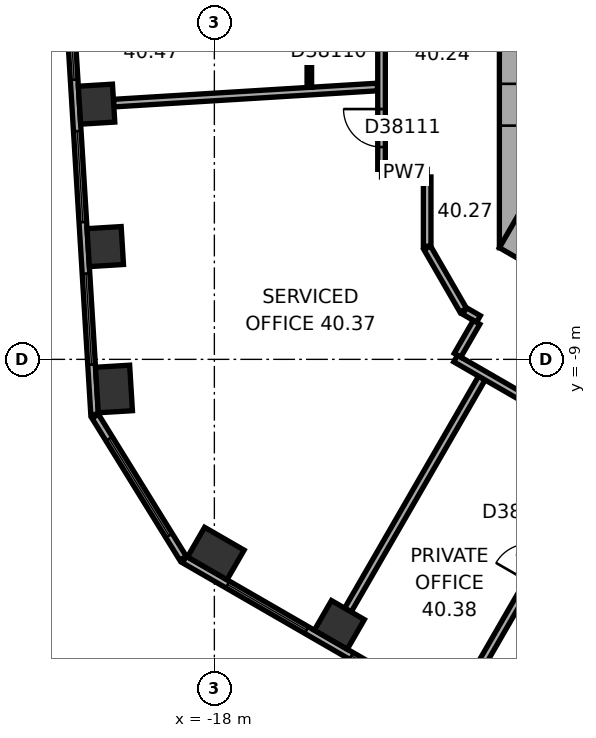
"""IFC4 building model, lengths in metres.
Left out: names, types, materials, properties, quantities, classifications, styles, units other than length and angle.
Written with IfcOpenShell. Run it as: python <this file> out.ifc"""

import sys

from ifc_helpers import new_model, si_unit, direction, frame, frame_2d, origin, origin_2d, place, context, subcontext, project, spatial, rectangle, extrude, element, fill, save


model = new_model("IFC4")
c1 = context("Model", 3, precision=1e-05, world=origin(), true_north=direction((0.0, 1.0)))
c2 = subcontext(c1, "Body", "Model", "MODEL_VIEW")
j1 = project(units=[si_unit("LENGTHUNIT", "METRE"), si_unit("PLANEANGLEUNIT", "RADIAN")], contexts=[c1])
p1 = place(None, origin())
s1 = spatial("IfcSite", under=j1, at=p1, CompositionType="ELEMENT")
p2 = place(p1, origin())
s2 = spatial("IfcBuilding", under=s1, at=p2, CompositionType="ELEMENT")
p3 = place(p2, frame((0.0, 0.0, 165.1)))
s3 = spatial("IfcBuildingStorey", under=s2, at=p3, CompositionType="ELEMENT", Elevation=165.1)
for number, where, z_axis, x_axis in (
    (1, (-21.1, -2.285, 0.0), (0.0, 0.0, 1.0), (0.061, -0.998, 0.0)),
    (2, (-20.871, -6.032, 0.0), (0.0, 0.0, 1.0), (0.061, -0.998, 0.0)),
):
    element("IfcColumn", number, at=place(p3, frame(where, z_axis=z_axis, x_axis=x_axis)), inside=s3, PredefinedType="COLUMN", context=c2, shape_type="SweptSolid", body=[
        extrude(rectangle(XDim=1.0, YDim=0.9, at=origin_2d()), origin(), (0.0, 0.0, 1.0), 3.7),
    ])
for number, where, z_axis, x_axis in (
    (3, (-20.642, -9.779, 0.0), (0.0, 0.0, 1.0), (0.061, -0.998, 0.0)),
    (4, (-17.962, -14.109, 0.0), (0.0, 0.0, 1.0), (0.866, -0.5, 0.0)),
):
    element("IfcColumn", number, at=place(p3, frame(where, z_axis=z_axis, x_axis=x_axis)), inside=s3, PredefinedType="COLUMN", context=c2, shape_type="SweptSolid", body=[
        extrude(rectangle(XDim=1.2, YDim=0.9, at=origin_2d()), origin(), (0.0, 0.0, 1.0), 3.7),
    ])
p4 = place(p3, frame((-14.711, -15.986, 0.0), z_axis=(0.0, 0.0, 1.0), x_axis=(0.866025403784, -0.5, 0.0)))
e5 = element("IfcColumn", 5, at=p4, inside=s3, PredefinedType="COLUMN", context=c2, shape_type="SweptSolid", body=[
    extrude(rectangle(XDim=1.0, YDim=0.9, at=origin_2d()), origin(), (0.0, 0.0, 1.0), 3.7),
])
p5 = place(p3, frame((-10.0, 6.062, 0.0), z_axis=(0.0, 0.0, 1.0), x_axis=(0.0, -1.0, 0.0)))
e6 = element("IfcWall", 6, at=p5, inside=s3, PredefinedType="SHEAR", context=c2, shape_type="SweptSolid", body=[
    extrude(rectangle(XDim=12.125, YDim=1.0, at=frame_2d((6.062, 0.0))), origin(), (0.0, 0.0, 1.0), 3.7),
])
p6 = place(p5, frame((5.212, 0.0, 0.0)))
e7 = element("IfcOpeningElement", 7, at=p6, cuts=e6, PredefinedType="OPENING", context=c2, shape_type="SweptSolid", body=[
    extrude(rectangle(XDim=1.1, YDim=2.1, at=frame_2d((0.55, 1.05))), frame((0.0, 0.51, 0.0), z_axis=(0.0, -1.0, 0.0), x_axis=(1.0, 0.0, 0.0)), (0.0, 0.0, 1.0), 1.02),
])
p7 = place(p5, frame((7.812, 0.0, 0.0)))
e8 = element("IfcOpeningElement", 8, at=p7, cuts=e6, PredefinedType="OPENING", context=c2, shape_type="SweptSolid", body=[
    extrude(rectangle(XDim=1.1, YDim=2.1, at=frame_2d((0.55, 1.05))), frame((0.0, 0.51, 0.0), z_axis=(0.0, -1.0, 0.0), x_axis=(1.0, 0.0, 0.0)), (0.0, 0.0, 1.0), 1.02),
])
p8 = place(p3, frame((-10.25, -5.629, 0.0), z_axis=(0.0, 0.0, 1.0), x_axis=(0.866022616891, -0.50000482701, 0.0)))
e9 = element("IfcWall", 9, at=p8, inside=s3, PredefinedType="SHEAR", context=c2, shape_type="SweptSolid", body=[
    extrude(rectangle(XDim=12.125, YDim=1.0, at=frame_2d((6.062, 0.0))), origin(), (0.0, 0.0, 1.0), 3.7),
])
p9 = place(p8, frame((6.262, 0.0, 0.0)))
e10 = element("IfcOpeningElement", 10, at=p9, cuts=e9, PredefinedType="OPENING", context=c2, shape_type="SweptSolid", body=[
    extrude(rectangle(XDim=1.5, YDim=2.1, at=frame_2d((0.75, 1.05))), frame((0.0, 0.51, 0.0), z_axis=(0.0, -1.0, 0.0), x_axis=(1.0, 0.0, 0.0)), (0.0, 0.0, 1.0), 1.02),
])
p10 = place(p8, frame((1.712, 0.0, 0.0)))
e11 = element("IfcOpeningElement", 11, at=p10, cuts=e9, PredefinedType="OPENING", context=c2, shape_type="SweptSolid", body=[
    extrude(rectangle(XDim=1.1, YDim=2.1, at=frame_2d((0.55, 1.05))), frame((0.0, 0.51, 0.0), z_axis=(0.0, -1.0, 0.0), x_axis=(1.0, 0.0, 0.0)), (0.0, 0.0, 1.0), 1.02),
])
p11 = place(p8, frame((4.312, 0.0, 0.0)))
e12 = element("IfcOpeningElement", 12, at=p11, cuts=e9, PredefinedType="OPENING", context=c2, shape_type="SweptSolid", body=[
    extrude(rectangle(XDim=1.1, YDim=2.1, at=frame_2d((0.55, 1.05))), frame((0.0, 0.51, 0.0), z_axis=(0.0, -1.0, 0.0), x_axis=(1.0, 0.0, 0.0)), (0.0, 0.0, 1.0), 1.02),
])
p12 = place(p3, frame((-22.375, 9.557, 0.0), z_axis=(0.0, 0.0, 1.0), x_axis=(0.061036015339, -0.998135564356, 0.0)))
e13 = element("IfcWall", 13, at=p12, inside=s3, PredefinedType="STANDARD", context=c2, shape_type="SweptSolid", body=[
    extrude(rectangle(XDim=20.044, YDim=0.2, at=frame_2d((10.022, 0.0))), origin(), (0.0, 0.0, 1.0), 3.7),
])
p13 = place(p12, frame((1.313, 0.0, 0.9)))
e14 = element("IfcOpeningElement", 14, at=p13, cuts=e13, PredefinedType="OPENING", context=c2, shape_type="SweptSolid", body=[
    extrude(rectangle(XDim=2.4, YDim=2.0, at=frame_2d((1.2, 1.0))), frame((0.0, 0.11, 0.0), z_axis=(0.0, -1.0, 0.0), x_axis=(1.0, 0.0, 0.0)), (0.0, 0.0, 1.0), 0.22),
])
p14 = place(p12, frame((5.067, 0.0, 0.9)))
e15 = element("IfcOpeningElement", 15, at=p14, cuts=e13, PredefinedType="OPENING", context=c2, shape_type="SweptSolid", body=[
    extrude(rectangle(XDim=2.4, YDim=2.0, at=frame_2d((1.2, 1.0))), frame((0.0, 0.11, 0.0), z_axis=(0.0, -1.0, 0.0), x_axis=(1.0, 0.0, 0.0)), (0.0, 0.0, 1.0), 0.22),
])
p15 = place(p12, frame((8.821, 0.0, 0.9)))
e16 = element("IfcOpeningElement", 16, at=p15, cuts=e13, PredefinedType="OPENING", context=c2, shape_type="SweptSolid", body=[
    extrude(rectangle(XDim=2.4, YDim=2.0, at=frame_2d((1.2, 1.0))), frame((0.0, 0.11, 0.0), z_axis=(0.0, -1.0, 0.0), x_axis=(1.0, 0.0, 0.0)), (0.0, 0.0, 1.0), 0.22),
])
p16 = place(p12, frame((12.575, 0.0, 0.9)))
e17 = element("IfcOpeningElement", 17, at=p16, cuts=e13, PredefinedType="OPENING", context=c2, shape_type="SweptSolid", body=[
    extrude(rectangle(XDim=2.4, YDim=2.0, at=frame_2d((1.2, 1.0))), frame((0.0, 0.11, 0.0), z_axis=(0.0, -1.0, 0.0), x_axis=(1.0, 0.0, 0.0)), (0.0, 0.0, 1.0), 0.22),
])
p17 = place(p12, frame((16.329, 0.0, 0.9)))
e18 = element("IfcOpeningElement", 18, at=p17, cuts=e13, PredefinedType="OPENING", context=c2, shape_type="SweptSolid", body=[
    extrude(rectangle(XDim=2.4, YDim=2.0, at=frame_2d((1.2, 1.0))), frame((0.0, 0.11, 0.0), z_axis=(0.0, -1.0, 0.0), x_axis=(1.0, 0.0, 0.0)), (0.0, 0.0, 1.0), 0.22),
])
p18 = place(p3, frame((-21.137, -10.496, 0.0), z_axis=(0.0, 0.0, 1.0), x_axis=(0.526178661629, -0.850374044786, 0.0)))
e19 = element("IfcWall", 19, at=p18, inside=s3, PredefinedType="STANDARD", context=c2, shape_type="SweptSolid", body=[
    extrude(rectangle(XDim=4.395, YDim=0.2, at=frame_2d((2.197, 0.0))), origin(), (0.0, 0.0, 1.0), 3.7),
])
p19 = place(p18, frame((0.698, 0.0, 0.9)))
e20 = element("IfcOpeningElement", 20, at=p19, cuts=e19, PredefinedType="OPENING", context=c2, shape_type="SweptSolid", body=[
    extrude(rectangle(XDim=3.0, YDim=2.0, at=frame_2d((1.5, 1.0))), frame((0.0, 0.11, 0.0), z_axis=(0.0, -1.0, 0.0), x_axis=(1.0, 0.0, 0.0)), (0.0, 0.0, 1.0), 0.22),
])
p20 = place(p3, frame((-18.789, -14.267, 0.0), z_axis=(0.0, 0.0, 1.0), x_axis=(0.866023315909, -0.500003616288, 0.0)))
e21 = element("IfcWall", 21, at=p20, inside=s3, PredefinedType="STANDARD", context=c2, shape_type="SweptSolid", body=[
    extrude(rectangle(XDim=20.044, YDim=0.2, at=frame_2d((10.022, 0.0))), origin(), (0.0, 0.0, 1.0), 3.7),
])
p21 = place(p20, frame((1.314, 0.0, 0.9)))
e22 = element("IfcOpeningElement", 22, at=p21, cuts=e21, PredefinedType="OPENING", context=c2, shape_type="SweptSolid", body=[
    extrude(rectangle(XDim=2.4, YDim=2.0, at=frame_2d((1.2, 1.0))), frame((0.0, 0.11, 0.0), z_axis=(0.0, -1.0, 0.0), x_axis=(1.0, 0.0, 0.0)), (0.0, 0.0, 1.0), 0.22),
])
p22 = place(p20, frame((5.069, 0.0, 0.9)))
e23 = element("IfcOpeningElement", 23, at=p22, cuts=e21, PredefinedType="OPENING", context=c2, shape_type="SweptSolid", body=[
    extrude(rectangle(XDim=2.4, YDim=2.0, at=frame_2d((1.2, 1.0))), frame((0.0, 0.11, 0.0), z_axis=(0.0, -1.0, 0.0), x_axis=(1.0, 0.0, 0.0)), (0.0, 0.0, 1.0), 0.22),
])
p23 = place(p20, frame((8.823, 0.0, 0.9)))
e24 = element("IfcOpeningElement", 24, at=p23, cuts=e21, PredefinedType="OPENING", context=c2, shape_type="SweptSolid", body=[
    extrude(rectangle(XDim=2.4, YDim=2.0, at=frame_2d((1.2, 1.0))), frame((0.0, 0.11, 0.0), z_axis=(0.0, -1.0, 0.0), x_axis=(1.0, 0.0, 0.0)), (0.0, 0.0, 1.0), 0.22),
])
p24 = place(p20, frame((12.577, 0.0, 0.9)))
e25 = element("IfcOpeningElement", 25, at=p24, cuts=e21, PredefinedType="OPENING", context=c2, shape_type="SweptSolid", body=[
    extrude(rectangle(XDim=2.4, YDim=2.0, at=frame_2d((1.2, 1.0))), frame((0.0, 0.11, 0.0), z_axis=(0.0, -1.0, 0.0), x_axis=(1.0, 0.0, 0.0)), (0.0, 0.0, 1.0), 0.22),
])
p25 = place(p20, frame((16.331, 0.0, 0.9)))
e26 = element("IfcOpeningElement", 26, at=p25, cuts=e21, PredefinedType="OPENING", context=c2, shape_type="SweptSolid", body=[
    extrude(rectangle(XDim=2.4, YDim=2.0, at=frame_2d((1.2, 1.0))), frame((0.0, 0.11, 0.0), z_axis=(0.0, -1.0, 0.0), x_axis=(1.0, 0.0, 0.0)), (0.0, 0.0, 1.0), 0.22),
])
p26 = place(p3, frame((-20.651, -2.258, 0.0), z_axis=(0.0, 0.0, 1.0), x_axis=(0.998133960965, 0.061062230286, 0.0)))
e27 = element("IfcWall", 27, at=p26, inside=s3, PredefinedType="PARTITIONING", context=c2, shape_type="SweptSolid", body=[
    extrude(rectangle(XDim=6.953, YDim=0.2, at=frame_2d((3.477, 0.0))), origin(), (0.0, 0.0, 1.0), 3.42),
])
p27 = place(p3, frame((-15.501, 5.479, 0.0), z_axis=(0.0, 0.0, 1.0), x_axis=(0.0, -1.0, 0.0)))
e28 = element("IfcWall", 28, at=p27, inside=s3, PredefinedType="PARTITIONING", context=c2, shape_type="SweptSolid", body=[
    extrude(rectangle(XDim=7.322, YDim=0.12, at=frame_2d((3.661, 0.0))), origin(), (0.0, 0.0, 1.0), 3.42),
])
p28 = place(p27, frame((0.55, 0.0, 0.0)))
e29 = element("IfcOpeningElement", 29, at=p28, cuts=e28, PredefinedType="OPENING", context=c2, shape_type="SweptSolid", body=[
    extrude(rectangle(XDim=1.0, YDim=2.1, at=frame_2d((0.5, 1.05))), frame((0.0, 0.07, 0.0), z_axis=(0.0, -1.0, 0.0), x_axis=(1.0, 0.0, 0.0)), (0.0, 0.0, 1.0), 0.14),
])
p29 = place(p27, frame((2.736, 0.0, 0.0)))
e30 = element("IfcOpeningElement", 30, at=p29, cuts=e28, PredefinedType="OPENING", context=c2, shape_type="SweptSolid", body=[
    extrude(rectangle(XDim=0.9, YDim=2.1, at=frame_2d((0.45, 1.05))), frame((0.0, 0.07, 0.0), z_axis=(0.0, -1.0, 0.0), x_axis=(1.0, 0.0, 0.0)), (0.0, 0.0, 1.0), 0.14),
])
p30 = place(p27, frame((5.347, 0.0, 0.0)))
e31 = element("IfcOpeningElement", 31, at=p30, cuts=e28, PredefinedType="OPENING", context=c2, shape_type="SweptSolid", body=[
    extrude(rectangle(XDim=0.9, YDim=2.1, at=frame_2d((0.45, 1.05))), frame((0.0, 0.07, 0.0), z_axis=(0.0, -1.0, 0.0), x_axis=(1.0, 0.0, 0.0)), (0.0, 0.0, 1.0), 0.14),
])
p31 = place(p3, frame((-14.486, -15.597, 0.0), z_axis=(0.0, 0.0, 1.0), x_axis=(0.499983284935, 0.866035054017, 0.0)))
e32 = element("IfcWall", 32, at=p31, inside=s3, PredefinedType="PARTITIONING", context=c2, shape_type="SweptSolid", body=[
    extrude(rectangle(XDim=7.049, YDim=0.2, at=frame_2d((3.524, 0.0))), origin(), (0.0, 0.0, 1.0), 3.42),
])
p32 = place(p3, frame((-13.601, -4.101, 0.0), z_axis=(0.0, 0.0, 1.0), x_axis=(1.0, 0.0, 0.0)))
e33 = element("IfcWall", 33, at=p32, inside=s3, PredefinedType="PARTITIONING", context=c2, shape_type="SweptSolid", body=[
    extrude(rectangle(XDim=1.201, YDim=0.2, at=frame_2d((0.601, 0.0))), origin(), (0.0, 0.0, 1.0), 3.42),
])
p33 = place(p3, frame((-13.601, 2.101, 0.0), z_axis=(0.0, 0.0, 1.0), x_axis=(0.0, -1.0, 0.0)))
e34 = element("IfcWall", 34, at=p33, inside=s3, PredefinedType="PARTITIONING", context=c2, shape_type="SweptSolid", body=[
    extrude(rectangle(XDim=6.102, YDim=0.2, at=frame_2d((3.051, 0.0))), origin(), (0.0, 0.0, 1.0), 3.42),
])
p34 = place(p33, frame((1.464, 0.0, 0.0)))
e35 = element("IfcOpeningElement", 35, at=p34, cuts=e34, PredefinedType="OPENING", context=c2, shape_type="SweptSolid", body=[
    extrude(rectangle(XDim=1.0, YDim=2.1, at=frame_2d((0.5, 1.05))), frame((0.0, 0.11, 0.0), z_axis=(0.0, -1.0, 0.0), x_axis=(1.0, 0.0, 0.0)), (0.0, 0.0, 1.0), 0.22),
])
p35 = place(p33, frame((4.515, 0.0, 0.0)))
e36 = element("IfcOpeningElement", 36, at=p35, cuts=e34, PredefinedType="OPENING", context=c2, shape_type="SweptSolid", body=[
    extrude(rectangle(XDim=1.0, YDim=2.1, at=frame_2d((0.5, 1.05))), frame((0.0, 0.11, 0.0), z_axis=(0.0, -1.0, 0.0), x_axis=(1.0, 0.0, 0.0)), (0.0, 0.0, 1.0), 0.22),
])
p36 = place(p3, frame((-12.4, -6.062, 0.0), z_axis=(0.0, 0.0, 1.0), x_axis=(0.500022797313, -0.86601224135, 0.0)))
e37 = element("IfcWall", 37, at=p36, inside=s3, PredefinedType="PARTITIONING", context=c2, shape_type="SweptSolid", body=[
    extrude(rectangle(XDim=1.9, YDim=0.2, at=frame_2d((0.95, 0.0))), origin(), (0.0, 0.0, 1.0), 3.42),
])
p37 = place(p3, frame((-12.4, -4.201, 0.0), z_axis=(0.0, 0.0, 1.0), x_axis=(0.0, -1.0, 0.0)))
e38 = element("IfcWall", 38, at=p37, inside=s3, PredefinedType="PARTITIONING", context=c2, shape_type="SweptSolid", body=[
    extrude(rectangle(XDim=1.821, YDim=0.2, at=frame_2d((0.911, 0.0))), origin(), (0.0, 0.0, 1.0), 3.42),
])
p38 = place(p3, frame((-11.651, -8.978, 0.0), z_axis=(0.0, 0.0, 1.0), x_axis=(0.866010893236, -0.500025132165, 0.0)))
e39 = element("IfcWall", 39, at=p38, inside=s3, PredefinedType="PARTITIONING", context=c2, shape_type="SweptSolid", body=[
    extrude(rectangle(XDim=4.608, YDim=0.2, at=frame_2d((2.304, 0.0))), origin(), (0.0, 0.0, 1.0), 3.42),
])
p39 = place(p3, frame((-11.415, -7.728, 0.0), z_axis=(0.0, 0.0, 1.0), x_axis=(0.865915281873, -0.500190688257, 0.0)))
e40 = element("IfcWall", 40, at=p39, inside=s3, PredefinedType="PARTITIONING", context=c2, shape_type="SweptSolid", body=[
    extrude(rectangle(XDim=0.421, YDim=0.2, at=frame_2d((0.21, 0.0))), origin(), (0.0, 0.0, 1.0), 3.42),
])
p40 = place(p3, frame((-11.235, -17.474, 0.0), z_axis=(0.0, 0.0, 1.0), x_axis=(0.500009260695, 0.866020057054, 0.0)))
e41 = element("IfcWall", 41, at=p40, inside=s3, PredefinedType="PARTITIONING", context=c2, shape_type="SweptSolid", body=[
    extrude(rectangle(XDim=7.049, YDim=0.2, at=frame_2d((3.524, 0.0))), origin(), (0.0, 0.0, 1.0), 2.87),
])
p41 = place(p40, frame((3.024, 0.0, 0.0)))
e42 = element("IfcOpeningElement", 42, at=p41, cuts=e41, PredefinedType="OPENING", context=c2, shape_type="SweptSolid", body=[
    extrude(rectangle(XDim=1.0, YDim=2.1, at=frame_2d((0.5, 1.05))), frame((0.0, 0.11, 0.0), z_axis=(0.0, -1.0, 0.0), x_axis=(1.0, 0.0, 0.0)), (0.0, 0.0, 1.0), 0.22),
])
p42 = place(p3, frame((-11.101, -8.025, 0.0), z_axis=(0.0, 0.0, 1.0), x_axis=(-0.500074377092, -0.865982457891, 0.0)))
e43 = element("IfcWall", 43, at=p42, inside=s3, PredefinedType="PARTITIONING", context=c2, shape_type="SweptSolid", body=[
    extrude(rectangle(XDim=1.001, YDim=0.2, at=frame_2d((0.5, 0.0))), origin(), (0.0, 0.0, 1.0), 3.42),
])
p43 = place(p15, origin())
e44 = element("IfcWindow", 44, at=p43, inside=s3, PartitioningType="SINGLE_PANEL", PredefinedType="WINDOW", context=c2, shape_type="SweptSolid", body=[
    extrude(rectangle(XDim=2.4, YDim=2.0, at=frame_2d((1.2, 1.0))), frame((0.0, 0.03, 0.0), z_axis=(0.0, -1.0, 0.0), x_axis=(1.0, 0.0, 0.0)), (0.0, 0.0, 1.0), 0.06),
])
fill(e16, e44)
p44 = place(p16, origin())
e45 = element("IfcWindow", 45, at=p44, inside=s3, PartitioningType="SINGLE_PANEL", PredefinedType="WINDOW", context=c2, shape_type="SweptSolid", body=[
    extrude(rectangle(XDim=2.4, YDim=2.0, at=frame_2d((1.2, 1.0))), frame((0.0, 0.03, 0.0), z_axis=(0.0, -1.0, 0.0), x_axis=(1.0, 0.0, 0.0)), (0.0, 0.0, 1.0), 0.06),
])
fill(e17, e45)
p45 = place(p17, origin())
e46 = element("IfcWindow", 46, at=p45, inside=s3, PartitioningType="SINGLE_PANEL", PredefinedType="WINDOW", context=c2, shape_type="SweptSolid", body=[
    extrude(rectangle(XDim=2.4, YDim=2.0, at=frame_2d((1.2, 1.0))), frame((0.0, 0.03, 0.0), z_axis=(0.0, -1.0, 0.0), x_axis=(1.0, 0.0, 0.0)), (0.0, 0.0, 1.0), 0.06),
])
fill(e18, e46)
p46 = place(p19, origin())
e47 = element("IfcWindow", 47, at=p46, inside=s3, PartitioningType="SINGLE_PANEL", PredefinedType="WINDOW", context=c2, shape_type="SweptSolid", body=[
    extrude(rectangle(XDim=3.0, YDim=2.0, at=frame_2d((1.5, 1.0))), frame((0.0, 0.03, 0.0), z_axis=(0.0, -1.0, 0.0), x_axis=(1.0, 0.0, 0.0)), (0.0, 0.0, 1.0), 0.06),
])
fill(e20, e47)
p47 = place(p21, origin())
e48 = element("IfcWindow", 48, at=p47, inside=s3, PartitioningType="SINGLE_PANEL", PredefinedType="WINDOW", context=c2, shape_type="SweptSolid", body=[
    extrude(rectangle(XDim=2.4, YDim=2.0, at=frame_2d((1.2, 1.0))), frame((0.0, 0.03, 0.0), z_axis=(0.0, -1.0, 0.0), x_axis=(1.0, 0.0, 0.0)), (0.0, 0.0, 1.0), 0.06),
])
fill(e22, e48)
p48 = place(p22, origin())
e49 = element("IfcWindow", 49, at=p48, inside=s3, PartitioningType="SINGLE_PANEL", PredefinedType="WINDOW", context=c2, shape_type="SweptSolid", body=[
    extrude(rectangle(XDim=2.4, YDim=2.0, at=frame_2d((1.2, 1.0))), frame((0.0, 0.03, 0.0), z_axis=(0.0, -1.0, 0.0), x_axis=(1.0, 0.0, 0.0)), (0.0, 0.0, 1.0), 0.06),
])
fill(e23, e49)
p49 = place(p35, origin())
e50 = element("IfcDoor", 50, at=p49, inside=s3, OperationType="SINGLE_SWING_LEFT", PredefinedType="DOOR", context=c2, shape_type="SweptSolid", body=[
    extrude(rectangle(XDim=1.0, YDim=2.1, at=frame_2d((0.5, 1.05))), frame((0.0, 0.025, 0.0), z_axis=(0.0, -1.0, 0.0), x_axis=(1.0, 0.0, 0.0)), (0.0, 0.0, 1.0), 0.05),
])
fill(e36, e50)
save(model, sys.argv[1])
